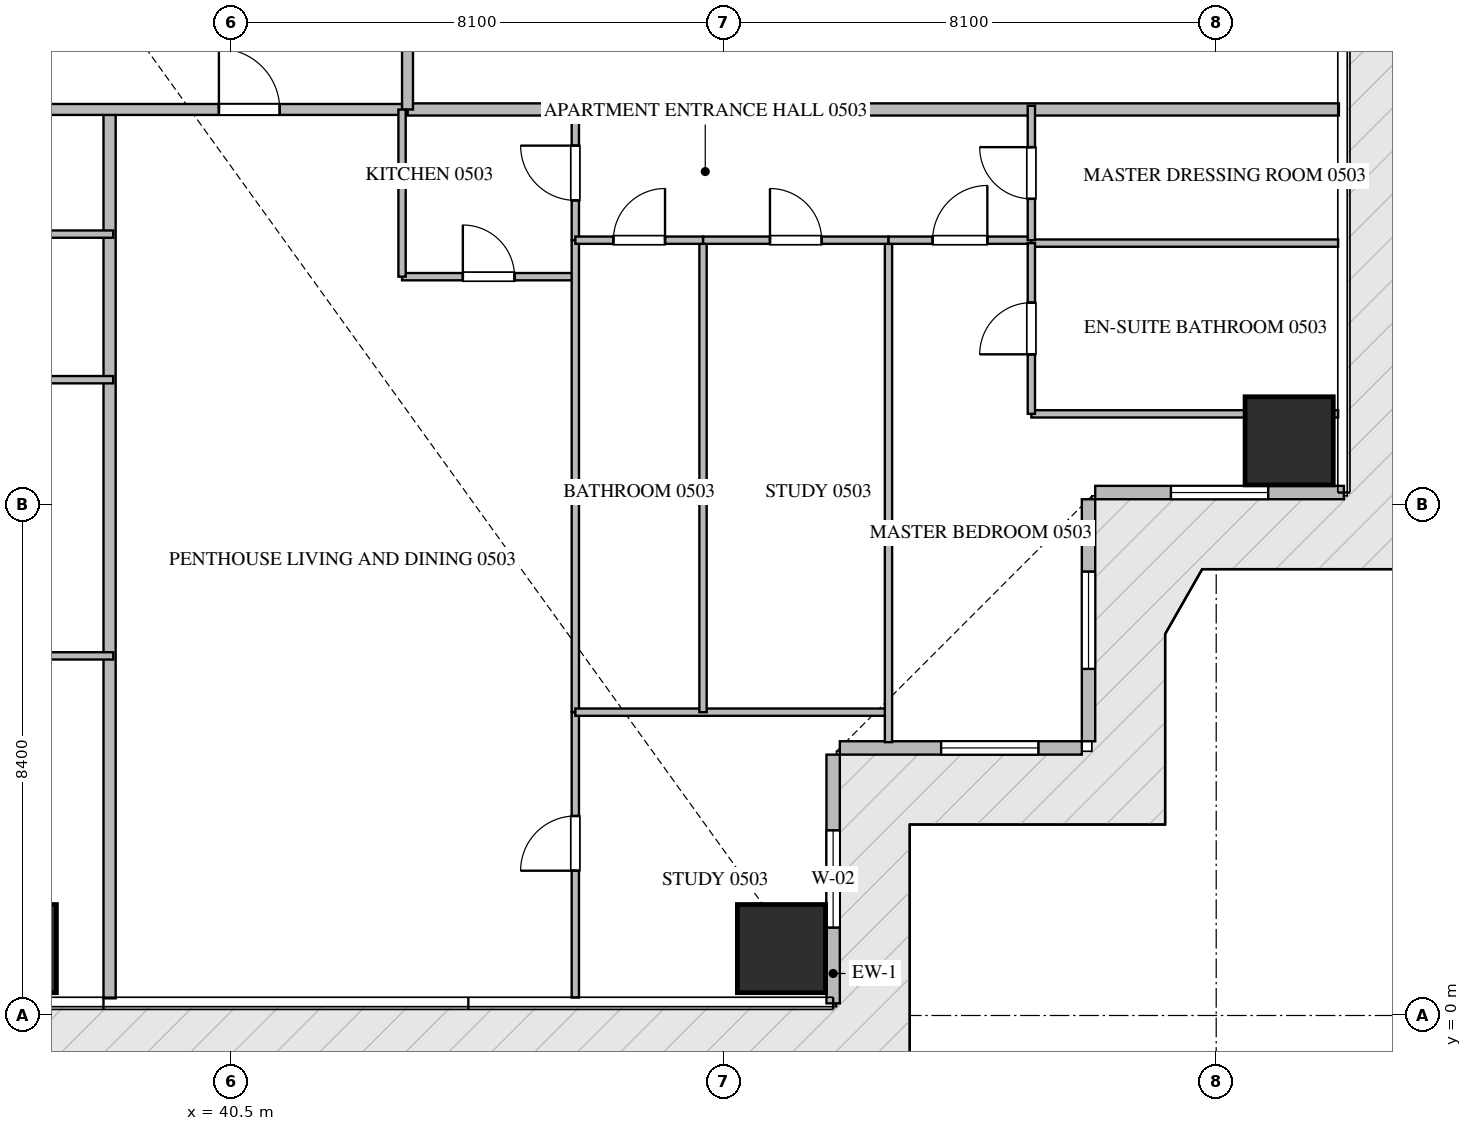
"""IFC4 building model, lengths in metres.
Left out: names, types, materials, properties, quantities, classifications, styles, units other than length and angle.
Written with IfcOpenShell. Run it as: python <this file> out.ifc"""

import sys

from ifc_helpers import new_model, si_unit, direction, frame, frame_2d, origin, origin_2d, place, context, subcontext, project, spatial, rectangle, extrude, source, transform, mapped, element, fill, save


model = new_model("IFC4")
c1 = context("Model", 3, precision=1e-05, world=origin(), true_north=direction((0.0, 1.0)))
c2 = subcontext(c1, "Body", "Model", "MODEL_VIEW")
j1 = project(units=[si_unit("LENGTHUNIT", "METRE"), si_unit("PLANEANGLEUNIT", "RADIAN")], contexts=[c1])
p1 = place(None, origin())
s1 = spatial("IfcSite", under=j1, at=p1, CompositionType="ELEMENT")
p2 = place(p1, origin())
s2 = spatial("IfcBuilding", under=s1, at=p2, CompositionType="ELEMENT")
p3 = place(p2, frame((0.0, 0.0, 26.7)))
s3 = spatial("IfcBuildingStorey", under=s2, at=p3, CompositionType="ELEMENT", Elevation=26.7)
m1 = source(origin(), c2, "Body", "SweptSolid", [
    extrude(rectangle(XDim=1.45, YDim=1.45, at=origin_2d()), origin(), (0.0, 0.0, 1.0), 3.93),
])
for number, where, z_axis, x_axis in (
    (1, (36.9, 1.1, -0.44), (0.0, 0.0, 1.0), (1.0, 0.0, 0.0)),
    (2, (49.55, 1.1, -0.44), (0.0, 0.0, 1.0), (1.0, 0.0, 0.0)),
    (3, (57.9, 9.45, -0.44), (0.0, 0.0, 1.0), (1.0, 0.0, 0.0)),
):
    element("IfcColumn", number, at=place(p3, frame(where, z_axis=z_axis, x_axis=x_axis)), inside=s3, PredefinedType="COLUMN", context=c2, shape_type="MappedRepresentation", body=[
        mapped(m1, transform((0.0, 0.0, 0.0), scale=1.0)),
    ])
p4 = place(p3, frame((50.4, 0.2, 0.0), z_axis=(0.0, 0.0, 1.0), x_axis=(0.0, 1.0, 0.0)))
e4 = element("IfcWall", 4, at=p4, inside=s3, PredefinedType="ELEMENTEDWALL", context=c2, shape_type="SweptSolid", body=[
    extrude(rectangle(XDim=4.09, YDim=0.22, at=frame_2d((2.045, 0.0))), origin(), (0.0, 0.0, 1.0), 3.475),
])
p5 = place(p4, frame((1.245, 0.0, 0.65)))
e5 = element("IfcOpeningElement", 5, at=p5, cuts=e4, PredefinedType="OPENING", context=c2, shape_type="SweptSolid", body=[
    extrude(rectangle(XDim=1.6, YDim=2.1, at=frame_2d((0.8, 1.05))), frame((0.0, 0.12, 0.0), z_axis=(0.0, -1.0, 0.0), x_axis=(1.0, 0.0, 0.0)), (0.0, 0.0, 1.0), 0.24),
])
p6 = place(p3, frame((50.51, 4.4, 0.0), z_axis=(0.0, 0.0, 1.0), x_axis=(1.0, 0.0, 0.0)))
e6 = element("IfcWall", 6, at=p6, inside=s3, PredefinedType="ELEMENTEDWALL", context=c2, shape_type="SweptSolid", body=[
    extrude(rectangle(XDim=3.98, YDim=0.22, at=frame_2d((1.99, 0.0))), origin(), (0.0, 0.0, 1.0), 3.475),
])
p7 = place(p6, frame((1.666, 0.0, 0.65)))
e7 = element("IfcOpeningElement", 7, at=p7, cuts=e6, PredefinedType="OPENING", context=c2, shape_type="SweptSolid", body=[
    extrude(rectangle(XDim=1.6, YDim=2.1, at=frame_2d((0.8, 1.05))), frame((0.0, 0.12, 0.0), z_axis=(0.0, -1.0, 0.0), x_axis=(1.0, 0.0, 0.0)), (0.0, 0.0, 1.0), 0.24),
])
p8 = place(p3, frame((54.6, 4.51, 0.0), z_axis=(0.0, 0.0, 1.0), x_axis=(0.0, 1.0, 0.0)))
e8 = element("IfcWall", 8, at=p8, inside=s3, PredefinedType="ELEMENTEDWALL", context=c2, shape_type="SweptSolid", body=[
    extrude(rectangle(XDim=3.98, YDim=0.22, at=frame_2d((1.99, 0.0))), origin(), (0.0, 0.0, 1.0), 3.475),
])
p9 = place(p8, frame((1.19, 0.0, 0.65)))
e9 = element("IfcOpeningElement", 9, at=p9, cuts=e8, PredefinedType="OPENING", context=c2, shape_type="SweptSolid", body=[
    extrude(rectangle(XDim=1.6, YDim=2.1, at=frame_2d((0.8, 1.05))), frame((0.0, 0.12, 0.0), z_axis=(0.0, -1.0, 0.0), x_axis=(1.0, 0.0, 0.0)), (0.0, 0.0, 1.0), 0.24),
])
p10 = place(p3, frame((54.71, 8.6, 0.0), z_axis=(0.0, 0.0, 1.0), x_axis=(1.0, 0.0, 0.0)))
e10 = element("IfcWall", 10, at=p10, inside=s3, PredefinedType="ELEMENTEDWALL", context=c2, shape_type="SweptSolid", body=[
    extrude(rectangle(XDim=4.09, YDim=0.22, at=frame_2d((2.045, 0.0))), origin(), (0.0, 0.0, 1.0), 3.475),
])
p11 = place(p10, frame((1.245, 0.0, 0.65)))
e11 = element("IfcOpeningElement", 11, at=p11, cuts=e10, PredefinedType="OPENING", context=c2, shape_type="SweptSolid", body=[
    extrude(rectangle(XDim=1.6, YDim=2.1, at=frame_2d((0.8, 1.05))), frame((0.0, 0.12, 0.0), z_axis=(0.0, -1.0, 0.0), x_axis=(1.0, 0.0, 0.0)), (0.0, 0.0, 1.0), 0.24),
])
p12 = place(p3, frame((38.5, 0.282, 0.0), z_axis=(0.0, 0.0, 1.0), x_axis=(0.0, 1.0, 0.0)))
e12 = element("IfcWall", 12, at=p12, inside=s3, PredefinedType="PARTITIONING", context=c2, shape_type="SweptSolid", body=[
    extrude(rectangle(XDim=14.618, YDim=0.2, at=frame_2d((7.309, 0.0))), origin(), (0.0, 0.0, 1.0), 3.49),
])
p13 = place(p3, frame((43.4, 14.9, 0.0), z_axis=(0.0, 0.0, 1.0), x_axis=(1.0, 0.0, 0.0)))
e13 = element("IfcWall", 13, at=p13, inside=s3, PredefinedType="PARTITIONING", context=c2, shape_type="SweptSolid", body=[
    extrude(rectangle(XDim=15.318, YDim=0.2, at=frame_2d((7.659, 0.0))), origin(), (0.0, 0.0, 1.0), 3.49),
])
p14 = place(p3, frame((21.402, 14.9, 0.0), z_axis=(0.0, 0.0, 1.0), x_axis=(1.0, 0.0, 0.0)))
e14 = element("IfcWall", 14, at=p14, inside=s3, PredefinedType="PARTITIONING", context=c2, shape_type="SweptSolid", body=[
    extrude(rectangle(XDim=21.996, YDim=0.18, at=frame_2d((10.998, 0.0))), origin(), (0.0, 0.0, 1.0), 3.49),
])
p15 = place(p14, frame((2.1, 0.0, 0.0)))
e15 = element("IfcOpeningElement", 15, at=p15, cuts=e14, PredefinedType="OPENING", context=c2, shape_type="SweptSolid", body=[
    extrude(rectangle(XDim=1.0, YDim=2.15, at=frame_2d((0.5, 1.075))), frame((0.0, 0.1, 0.0), z_axis=(0.0, -1.0, 0.0), x_axis=(1.0, 0.0, 0.0)), (0.0, 0.0, 1.0), 0.2),
])
p16 = place(p14, frame((6.719, 0.0, 0.0)))
e16 = element("IfcOpeningElement", 16, at=p16, cuts=e14, PredefinedType="OPENING", context=c2, shape_type="SweptSolid", body=[
    extrude(rectangle(XDim=1.0, YDim=2.15, at=frame_2d((0.5, 1.075))), frame((0.0, 0.1, 0.0), z_axis=(0.0, -1.0, 0.0), x_axis=(1.0, 0.0, 0.0)), (0.0, 0.0, 1.0), 0.2),
])
p17 = place(p14, frame((18.896, 0.0, 0.0)))
e17 = element("IfcOpeningElement", 17, at=p17, cuts=e14, PredefinedType="OPENING", context=c2, shape_type="SweptSolid", body=[
    extrude(rectangle(XDim=1.0, YDim=2.15, at=frame_2d((0.5, 1.075))), frame((0.0, 0.1, 0.0), z_axis=(0.0, -1.0, 0.0), x_axis=(1.0, 0.0, 0.0)), (0.0, 0.0, 1.0), 0.2),
])
p18 = place(p3, frame((43.4, 14.9, 0.0), z_axis=(0.0, 0.0, 1.0), x_axis=(0.0, 1.0, 0.0)))
e18 = element("IfcWall", 18, at=p18, inside=s3, PredefinedType="PARTITIONING", context=c2, shape_type="SweptSolid", body=[
    extrude(rectangle(XDim=20.6, YDim=0.18, at=frame_2d((10.3, 0.0))), origin(), (0.0, 0.0, 1.0), 3.49),
])
p19 = place(p18, frame((1.96, 0.0, 0.0)))
e19 = element("IfcOpeningElement", 19, at=p19, cuts=e18, PredefinedType="OPENING", context=c2, shape_type="SweptSolid", body=[
    extrude(rectangle(XDim=1.0, YDim=2.15, at=frame_2d((0.5, 1.075))), frame((0.0, 0.1, 0.0), z_axis=(0.0, -1.0, 0.0), x_axis=(1.0, 0.0, 0.0)), (0.0, 0.0, 1.0), 0.2),
])
for number, where, z_axis, x_axis in (
    (20, (30.94, 5.914, 0.0), (0.0, 0.0, 1.0), (1.0, 0.0, 0.0)),
    (21, (30.94, 10.456, 0.0), (0.0, 0.0, 1.0), (1.0, 0.0, 0.0)),
    (22, (30.94, 12.85, 0.0), (0.0, 0.0, 1.0), (1.0, 0.0, 0.0)),
):
    element("IfcWall", number, at=place(p3, frame(where, z_axis=z_axis, x_axis=x_axis)), inside=s3, PredefinedType="PARTITIONING", context=c2, shape_type="SweptSolid", body=[
        extrude(rectangle(XDim=7.62, YDim=0.12, at=frame_2d((3.81, 0.0))), origin(), (0.0, 0.0, 1.0), 3.49),
    ])
p20 = place(p3, frame((43.31, 12.15, 0.0), z_axis=(0.0, 0.0, 1.0), x_axis=(1.0, 0.0, 0.0)))
e23 = element("IfcWall", 23, at=p20, inside=s3, PredefinedType="PARTITIONING", context=c2, shape_type="SweptSolid", body=[
    extrude(rectangle(XDim=2.85, YDim=0.12, at=frame_2d((1.425, 0.0))), origin(), (0.0, 0.0, 1.0), 3.49),
])
p21 = place(p20, frame((1.0, 0.0, 0.0)))
e24 = element("IfcOpeningElement", 24, at=p21, cuts=e23, PredefinedType="OPENING", context=c2, shape_type="SweptSolid", body=[
    extrude(rectangle(XDim=0.85, YDim=2.1, at=frame_2d((0.425, 1.05))), frame((0.0, 0.07, 0.0), z_axis=(0.0, -1.0, 0.0), x_axis=(1.0, 0.0, 0.0)), (0.0, 0.0, 1.0), 0.14),
])
p22 = place(p3, frame((43.31, 12.15, 0.0), z_axis=(0.0, 0.0, 1.0), x_axis=(0.0, 1.0, 0.0)))
e25 = element("IfcWall", 25, at=p22, inside=s3, PredefinedType="PARTITIONING", context=c2, shape_type="SweptSolid", body=[
    extrude(rectangle(XDim=2.748, YDim=0.12, at=frame_2d((1.374, 0.0))), origin(), (0.0, 0.0, 1.0), 3.49),
])
p23 = place(p3, frame((46.16, 12.75, 0.0), z_axis=(0.0, 0.0, 1.0), x_axis=(0.0, 1.0, 0.0)))
e26 = element("IfcWall", 26, at=p23, inside=s3, PredefinedType="PARTITIONING", context=c2, shape_type="SweptSolid", body=[
    extrude(rectangle(XDim=2.21, YDim=0.12, at=frame_2d((1.105, 0.0))), origin(), (0.0, 0.0, 1.0), 3.49),
])
p24 = place(p23, frame((0.655, 0.0, 0.0)))
e27 = element("IfcOpeningElement", 27, at=p24, cuts=e26, PredefinedType="OPENING", context=c2, shape_type="SweptSolid", body=[
    extrude(rectangle(XDim=0.9, YDim=2.1, at=frame_2d((0.45, 1.05))), frame((0.0, 0.07, 0.0), z_axis=(0.0, -1.0, 0.0), x_axis=(1.0, 0.0, 0.0)), (0.0, 0.0, 1.0), 0.14),
])
p25 = place(p3, frame((46.16, 0.295, 0.0), z_axis=(0.0, 0.0, 1.0), x_axis=(0.0, 1.0, 0.0)))
e28 = element("IfcWall", 28, at=p25, inside=s3, PredefinedType="PARTITIONING", context=c2, shape_type="SweptSolid", body=[
    extrude(rectangle(XDim=4.693, YDim=0.12, at=frame_2d((2.347, 0.0))), origin(), (0.0, 0.0, 1.0), 3.49),
])
p26 = place(p25, frame((2.086, 0.0, 0.0)))
e29 = element("IfcOpeningElement", 29, at=p26, cuts=e28, PredefinedType="OPENING", context=c2, shape_type="SweptSolid", body=[
    extrude(rectangle(XDim=0.9, YDim=2.1, at=frame_2d((0.45, 1.05))), frame((0.0, 0.07, 0.0), z_axis=(0.0, -1.0, 0.0), x_axis=(1.0, 0.0, 0.0)), (0.0, 0.0, 1.0), 0.14),
])
p27 = place(p3, frame((46.16, 4.99, 0.0), z_axis=(0.0, 0.0, 1.0), x_axis=(0.0, 1.0, 0.0)))
e30 = element("IfcWall", 30, at=p27, inside=s3, PredefinedType="PARTITIONING", context=c2, shape_type="SweptSolid", body=[
    extrude(rectangle(XDim=7.758, YDim=0.12, at=frame_2d((3.879, 0.0))), origin(), (0.0, 0.0, 1.0), 3.49),
])
p28 = place(p3, frame((46.16, 4.988, 0.0), z_axis=(0.0, 0.0, 1.0), x_axis=(1.0, 0.0, 0.0)))
e31 = element("IfcWall", 31, at=p28, inside=s3, PredefinedType="PARTITIONING", context=c2, shape_type="SweptSolid", body=[
    extrude(rectangle(XDim=5.15, YDim=0.12, at=frame_2d((2.575, 0.0))), origin(), (0.0, 0.0, 1.0), 3.49),
])
p29 = place(p3, frame((51.31, 4.495, 0.0), z_axis=(0.0, 0.0, 1.0), x_axis=(0.0, 1.0, 0.0)))
e32 = element("IfcWall", 32, at=p29, inside=s3, PredefinedType="PARTITIONING", context=c2, shape_type="SweptSolid", body=[
    extrude(rectangle(XDim=8.255, YDim=0.12, at=frame_2d((4.127, 0.0))), origin(), (0.0, 0.0, 1.0), 3.49),
])
p30 = place(p3, frame((48.26, 4.988, 0.0), z_axis=(0.0, 0.0, 1.0), x_axis=(0.0, 1.0, 0.0)))
e33 = element("IfcWall", 33, at=p30, inside=s3, PredefinedType="PARTITIONING", context=c2, shape_type="SweptSolid", body=[
    extrude(rectangle(XDim=7.762, YDim=0.12, at=frame_2d((3.881, 0.0))), origin(), (0.0, 0.0, 1.0), 3.49),
])
p31 = place(p3, frame((46.16, 12.75, 0.0), z_axis=(0.0, 0.0, 1.0), x_axis=(1.0, 0.0, 0.0)))
e34 = element("IfcWall", 34, at=p31, inside=s3, PredefinedType="PARTITIONING", context=c2, shape_type="SweptSolid", body=[
    extrude(rectangle(XDim=2.1, YDim=0.12, at=frame_2d((1.05, 0.0))), origin(), (0.0, 0.0, 1.0), 3.49),
])
p32 = place(p31, frame((0.625, 0.0, 0.0)))
e35 = element("IfcOpeningElement", 35, at=p32, cuts=e34, PredefinedType="OPENING", context=c2, shape_type="SweptSolid", body=[
    extrude(rectangle(XDim=0.85, YDim=2.1, at=frame_2d((0.425, 1.05))), frame((0.0, 0.07, 0.0), z_axis=(0.0, -1.0, 0.0), x_axis=(1.0, 0.0, 0.0)), (0.0, 0.0, 1.0), 0.14),
])
p33 = place(p3, frame((48.262, 12.75, 0.0), z_axis=(0.0, 0.0, 1.0), x_axis=(1.0, 0.0, 0.0)))
e36 = element("IfcWall", 36, at=p33, inside=s3, PredefinedType="PARTITIONING", context=c2, shape_type="SweptSolid", body=[
    extrude(rectangle(XDim=3.048, YDim=0.12, at=frame_2d((1.524, 0.0))), origin(), (0.0, 0.0, 1.0), 3.49),
])
p34 = place(p33, frame((1.099, 0.0, 0.0)))
e37 = element("IfcOpeningElement", 37, at=p34, cuts=e36, PredefinedType="OPENING", context=c2, shape_type="SweptSolid", body=[
    extrude(rectangle(XDim=0.85, YDim=2.1, at=frame_2d((0.425, 1.05))), frame((0.0, 0.07, 0.0), z_axis=(0.0, -1.0, 0.0), x_axis=(1.0, 0.0, 0.0)), (0.0, 0.0, 1.0), 0.14),
])
p35 = place(p3, frame((51.312, 12.75, 0.0), z_axis=(0.0, 0.0, 1.0), x_axis=(1.0, 0.0, 0.0)))
e38 = element("IfcWall", 38, at=p35, inside=s3, PredefinedType="PARTITIONING", context=c2, shape_type="SweptSolid", body=[
    extrude(rectangle(XDim=2.348, YDim=0.12, at=frame_2d((1.174, 0.0))), origin(), (0.0, 0.0, 1.0), 3.49),
])
p36 = place(p35, frame((0.724, 0.0, 0.0)))
e39 = element("IfcOpeningElement", 39, at=p36, cuts=e38, PredefinedType="OPENING", context=c2, shape_type="SweptSolid", body=[
    extrude(rectangle(XDim=0.9, YDim=2.1, at=frame_2d((0.45, 1.05))), frame((0.0, 0.07, 0.0), z_axis=(0.0, -1.0, 0.0), x_axis=(1.0, 0.0, 0.0)), (0.0, 0.0, 1.0), 0.14),
])
p37 = place(p3, frame((53.66, 9.894, 0.0), z_axis=(0.0, 0.0, 1.0), x_axis=(1.0, 0.0, 0.0)))
e40 = element("IfcWall", 40, at=p37, inside=s3, PredefinedType="PARTITIONING", context=c2, shape_type="SweptSolid", body=[
    extrude(rectangle(XDim=5.045, YDim=0.12, at=frame_2d((2.522, 0.0))), origin(), (0.0, 0.0, 1.0), 3.49),
])
p38 = place(p3, frame((53.662, 12.702, 0.0), z_axis=(0.0, 0.0, 1.0), x_axis=(1.0, 0.0, 0.0)))
e41 = element("IfcWall", 41, at=p38, inside=s3, PredefinedType="PARTITIONING", context=c2, shape_type="SweptSolid", body=[
    extrude(rectangle(XDim=5.043, YDim=0.12, at=frame_2d((2.521, 0.0))), origin(), (0.0, 0.0, 1.0), 3.49),
])
p39 = place(p3, frame((53.66, 9.894, 0.0), z_axis=(0.0, 0.0, 1.0), x_axis=(0.0, 1.0, 0.0)))
e42 = element("IfcWall", 42, at=p39, inside=s3, PredefinedType="PARTITIONING", context=c2, shape_type="SweptSolid", body=[
    extrude(rectangle(XDim=2.808, YDim=0.12, at=frame_2d((1.404, 0.0))), origin(), (0.0, 0.0, 1.0), 3.49),
])
p40 = place(p39, frame((0.979, 0.0, 0.0)))
e43 = element("IfcOpeningElement", 43, at=p40, cuts=e42, PredefinedType="OPENING", context=c2, shape_type="SweptSolid", body=[
    extrude(rectangle(XDim=0.85, YDim=2.1, at=frame_2d((0.425, 1.05))), frame((0.0, 0.07, 0.0), z_axis=(0.0, -1.0, 0.0), x_axis=(1.0, 0.0, 0.0)), (0.0, 0.0, 1.0), 0.14),
])
p41 = place(p3, frame((53.66, 12.75, 0.0), z_axis=(0.0, 0.0, 1.0), x_axis=(0.0, 1.0, 0.0)))
e44 = element("IfcWall", 44, at=p41, inside=s3, PredefinedType="PARTITIONING", context=c2, shape_type="SweptSolid", body=[
    extrude(rectangle(XDim=2.21, YDim=0.12, at=frame_2d((1.105, 0.0))), origin(), (0.0, 0.0, 1.0), 3.49),
])
p42 = place(p41, frame((0.68, 0.0, 0.0)))
e45 = element("IfcOpeningElement", 45, at=p42, cuts=e44, PredefinedType="OPENING", context=c2, shape_type="SweptSolid", body=[
    extrude(rectangle(XDim=0.85, YDim=2.1, at=frame_2d((0.425, 1.05))), frame((0.0, 0.07, 0.0), z_axis=(0.0, -1.0, 0.0), x_axis=(1.0, 0.0, 0.0)), (0.0, 0.0, 1.0), 0.14),
])
m2 = source(origin(), c2, "Body", "SweptSolid", [
    extrude(rectangle(XDim=1.6, YDim=2.1, at=frame_2d((0.8, 1.05))), frame((0.0, 0.03, 0.0), z_axis=(0.0, -1.0, 0.0), x_axis=(1.0, 0.0, 0.0)), (0.0, 0.0, 1.0), 0.06),
])
p43 = place(p5, origin())
e46 = element("IfcWindow", 46, at=p43, inside=s3, PartitioningType="SINGLE_PANEL", PredefinedType="WINDOW", context=c2, shape_type="MappedRepresentation", body=[
    mapped(m2, transform((0.0, 0.0, 0.0), scale=1.0)),
])
fill(e5, e46)
p44 = place(p7, origin())
e47 = element("IfcWindow", 47, at=p44, inside=s3, PartitioningType="SINGLE_PANEL", PredefinedType="WINDOW", context=c2, shape_type="MappedRepresentation", body=[
    mapped(m2, transform((0.0, 0.0, 0.0), scale=1.0)),
])
fill(e7, e47)
p45 = place(p9, origin())
e48 = element("IfcWindow", 48, at=p45, inside=s3, PartitioningType="SINGLE_PANEL", PredefinedType="WINDOW", context=c2, shape_type="MappedRepresentation", body=[
    mapped(m2, transform((0.0, 0.0, 0.0), scale=1.0)),
])
fill(e9, e48)
p46 = place(p11, origin())
e49 = element("IfcWindow", 49, at=p46, inside=s3, PartitioningType="SINGLE_PANEL", PredefinedType="WINDOW", context=c2, shape_type="MappedRepresentation", body=[
    mapped(m2, transform((0.0, 0.0, 0.0), scale=1.0)),
])
fill(e11, e49)
m3 = source(origin(), c2, "Body", "SweptSolid", [
    extrude(rectangle(XDim=1.0, YDim=2.15, at=frame_2d((0.5, 1.075))), frame((0.0, 0.025, 0.0), z_axis=(0.0, -1.0, 0.0), x_axis=(1.0, 0.0, 0.0)), (0.0, 0.0, 1.0), 0.05),
])
p47 = place(p17, origin())
e50 = element("IfcDoor", 50, at=p47, inside=s3, OperationType="SINGLE_SWING_LEFT", PredefinedType="DOOR", context=c2, shape_type="MappedRepresentation", body=[
    mapped(m3, transform((0.0, 0.0, 0.0), scale=1.0)),
])
fill(e17, e50)
m4 = source(origin(), c2, "Body", "SweptSolid", [
    extrude(rectangle(XDim=0.85, YDim=2.1, at=frame_2d((0.425, 1.05))), frame((0.0, 0.025, 0.0), z_axis=(0.0, -1.0, 0.0), x_axis=(1.0, 0.0, 0.0)), (0.0, 0.0, 1.0), 0.05),
])
p48 = place(p21, origin())
e51 = element("IfcDoor", 51, at=p48, inside=s3, OperationType="SINGLE_SWING_LEFT", PredefinedType="DOOR", context=c2, shape_type="MappedRepresentation", body=[
    mapped(m4, transform((0.0, 0.0, 0.0), scale=1.0)),
])
fill(e24, e51)
m5 = source(origin(), c2, "Body", "SweptSolid", [
    extrude(rectangle(XDim=0.9, YDim=2.1, at=frame_2d((0.45, 1.05))), frame((0.0, 0.025, 0.0), z_axis=(0.0, -1.0, 0.0), x_axis=(1.0, 0.0, 0.0)), (0.0, 0.0, 1.0), 0.05),
])
p49 = place(p24, origin())
e52 = element("IfcDoor", 52, at=p49, inside=s3, OperationType="SINGLE_SWING_RIGHT", PredefinedType="DOOR", context=c2, shape_type="MappedRepresentation", body=[
    mapped(m5, transform((0.0, 0.0, 0.0), scale=1.0)),
])
fill(e27, e52)
p50 = place(p26, origin())
e53 = element("IfcDoor", 53, at=p50, inside=s3, OperationType="SINGLE_SWING_LEFT", PredefinedType="DOOR", context=c2, shape_type="MappedRepresentation", body=[
    mapped(m5, transform((0.0, 0.0, 0.0), scale=1.0)),
])
fill(e29, e53)
p51 = place(p32, origin())
e54 = element("IfcDoor", 54, at=p51, inside=s3, OperationType="SINGLE_SWING_RIGHT", PredefinedType="DOOR", context=c2, shape_type="MappedRepresentation", body=[
    mapped(m4, transform((0.0, 0.0, 0.0), scale=1.0)),
])
fill(e35, e54)
p52 = place(p34, origin())
e55 = element("IfcDoor", 55, at=p52, inside=s3, OperationType="SINGLE_SWING_LEFT", PredefinedType="DOOR", context=c2, shape_type="MappedRepresentation", body=[
    mapped(m4, transform((0.0, 0.0, 0.0), scale=1.0)),
])
fill(e37, e55)
p53 = place(p36, origin())
e56 = element("IfcDoor", 56, at=p53, inside=s3, OperationType="SINGLE_SWING_RIGHT", PredefinedType="DOOR", context=c2, shape_type="MappedRepresentation", body=[
    mapped(m5, transform((0.0, 0.0, 0.0), scale=1.0)),
])
fill(e39, e56)
p54 = place(p40, origin())
e57 = element("IfcDoor", 57, at=p54, inside=s3, OperationType="SINGLE_SWING_LEFT", PredefinedType="DOOR", context=c2, shape_type="MappedRepresentation", body=[
    mapped(m4, transform((0.0, 0.0, 0.0), scale=1.0)),
])
fill(e43, e57)
p55 = place(p42, origin())
e58 = element("IfcDoor", 58, at=p55, inside=s3, OperationType="SINGLE_SWING_RIGHT", PredefinedType="DOOR", context=c2, shape_type="MappedRepresentation", body=[
    mapped(m4, transform((0.0, 0.0, 0.0), scale=1.0)),
])
fill(e45, e58)
save(model, sys.argv[1])
